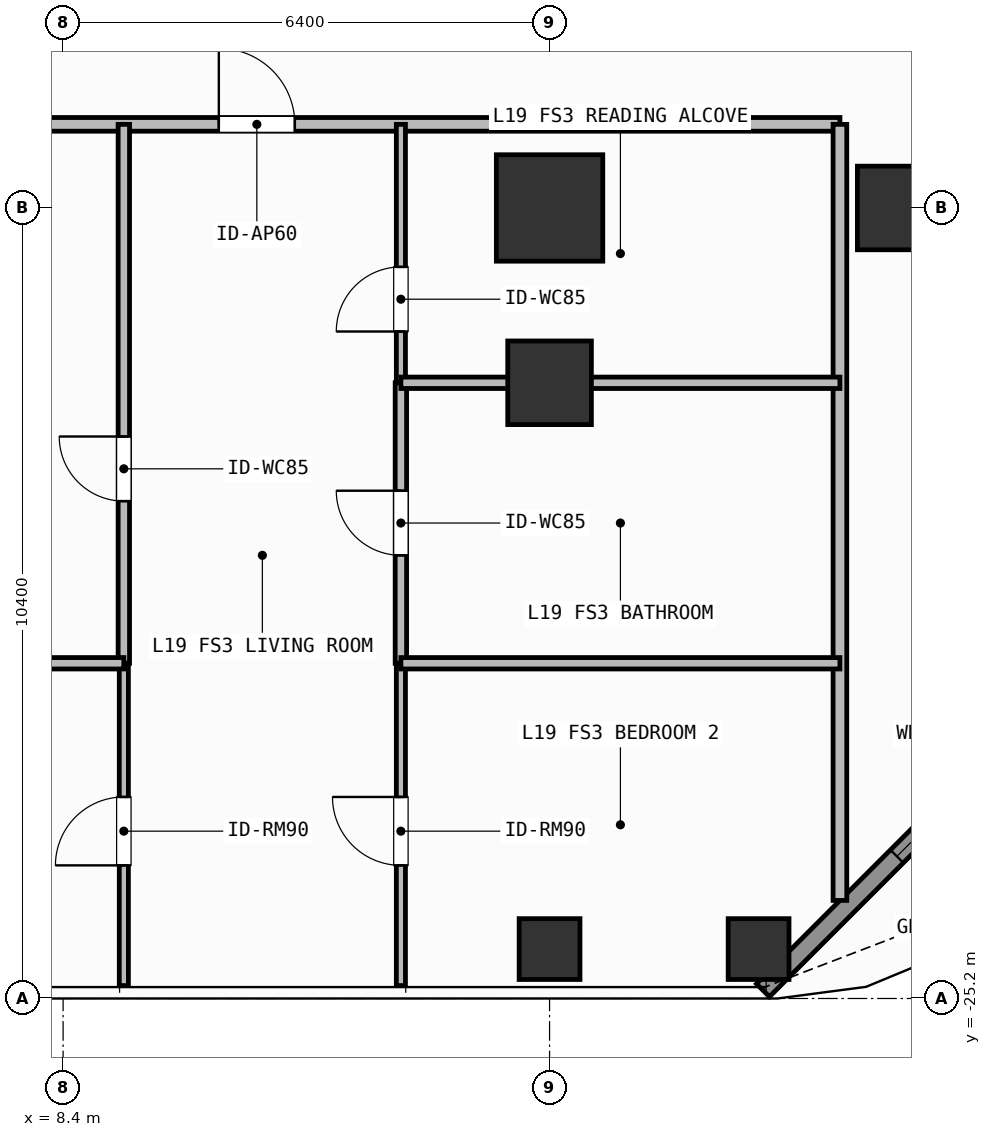
"""IFC4 building model, lengths in metres.
Left out: names, types, materials, properties, quantities, classifications, styles, units other than length and angle.
Written with IfcOpenShell. Run it as: python <this file> out.ifc"""

import sys

from ifc_helpers import new_model, si_unit, direction, frame, frame_2d, origin, origin_2d, place, context, subcontext, project, spatial, rectangle, hollow_rectangle, extrude, element, fill, save


model = new_model("IFC4")
c1 = context("Model", 3, precision=1e-05, world=origin(), true_north=direction((0.0, 1.0)))
c2 = subcontext(c1, "Body", "Model", "MODEL_VIEW")
j1 = project(units=[si_unit("LENGTHUNIT", "METRE"), si_unit("PLANEANGLEUNIT", "RADIAN")], contexts=[c1])
p1 = place(None, origin())
s1 = spatial("IfcSite", under=j1, at=p1, CompositionType="ELEMENT")
p2 = place(p1, origin())
s2 = spatial("IfcBuilding", under=s1, at=p2, CompositionType="ELEMENT")
p3 = place(p2, frame((0.0, 0.0, 73.5)))
s3 = spatial("IfcBuildingStorey", under=s2, at=p3, CompositionType="ELEMENT", Elevation=73.5)
p4 = place(p3, frame((14.8, -14.8, 0.0), z_axis=(0.0, 0.0, 1.0), x_axis=(1.0, 0.0, 0.0)))
e1 = element("IfcColumn", 1, at=p4, inside=s3, PredefinedType="COLUMN", context=c2, shape_type="SweptSolid", body=[
    extrude(rectangle(XDim=1.4, YDim=1.4, at=origin_2d()), origin(), (0.0, 0.0, 1.0), 3.9),
])
for number, where, z_axis, x_axis in (
    (2, (19.4, -14.8, 0.0), (0.0, 0.0, 1.0), (1.0, 0.0, 0.0)),
    (3, (14.8, -17.1, 0.0), (0.0, 0.0, 1.0), (1.0, 0.0, 0.0)),
):
    element("IfcColumn", number, at=place(p3, frame(where, z_axis=z_axis, x_axis=x_axis)), inside=s3, PredefinedType="COLUMN", context=c2, shape_type="SweptSolid", body=[
        extrude(rectangle(XDim=1.1, YDim=1.1, at=origin_2d()), origin(), (0.0, 0.0, 1.0), 3.9),
    ])
for number, where, z_axis, x_axis in (
    (4, (17.55, -24.55, 0.0), (0.0, 0.0, 1.0), (1.0, 0.0, 0.0)),
    (5, (14.8, -24.55, 0.0), (0.0, 0.0, 1.0), (1.0, 0.0, 0.0)),
):
    element("IfcColumn", number, at=place(p3, frame(where, z_axis=z_axis, x_axis=x_axis)), inside=s3, PredefinedType="COLUMN", context=c2, shape_type="SweptSolid", body=[
        extrude(hollow_rectangle(XDim=0.8, YDim=0.8, WallThickness=0.036, at=origin_2d()), origin(), (0.0, 0.0, 1.0), 3.9),
    ])
p5 = place(p3, frame((22.192, -20.508, 0.0), z_axis=(0.0, 0.0, 1.0), x_axis=(-0.707106781187, -0.707106781187, 0.0)))
e6 = element("IfcWall", 6, at=p5, inside=s3, PredefinedType="SOLIDWALL", context=c2, shape_type="SweptSolid", body=[
    extrude(rectangle(XDim=6.484, YDim=0.24, at=frame_2d((3.242, 0.0))), origin(), (0.0, 0.0, 1.0), 3.6),
])
p6 = place(p5, frame((2.492, 0.0, 0.8)))
e7 = element("IfcOpeningElement", 7, at=p6, cuts=e6, PredefinedType="OPENING", context=c2, shape_type="SweptSolid", body=[
    extrude(rectangle(XDim=1.5, YDim=1.85, at=frame_2d((0.75, 0.925))), frame((0.0, 0.13, 0.0), z_axis=(0.0, -1.0, 0.0), x_axis=(1.0, 0.0, 0.0)), (0.0, 0.0, 1.0), 0.26),
])
p7 = place(p3, frame((2.918, -13.7, 0.0), z_axis=(0.0, 0.0, 1.0), x_axis=(1.0, 0.0, 0.0)))
e8 = element("IfcWall", 8, at=p7, inside=s3, PredefinedType="PARTITIONING", context=c2, shape_type="SweptSolid", body=[
    extrude(rectangle(XDim=15.702, YDim=0.18, at=frame_2d((7.851, 0.0))), origin(), (0.0, 0.0, 1.0), 3.6),
])
p8 = place(p7, frame((7.531, 0.0, 0.0)))
e9 = element("IfcOpeningElement", 9, at=p8, cuts=e8, PredefinedType="OPENING", context=c2, shape_type="SweptSolid", body=[
    extrude(rectangle(XDim=1.0, YDim=2.2, at=frame_2d((0.5, 1.1))), frame((0.0, 0.1, 0.0), z_axis=(0.0, -1.0, 0.0), x_axis=(1.0, 0.0, 0.0)), (0.0, 0.0, 1.0), 0.2),
])
p9 = place(p3, frame((9.199, -20.79, 0.0), z_axis=(0.0, 0.0, 1.0), x_axis=(0.0, 1.0, 0.0)))
e10 = element("IfcWall", 10, at=p9, inside=s3, PredefinedType="PARTITIONING", context=c2, shape_type="SweptSolid", body=[
    extrude(rectangle(XDim=7.09, YDim=0.15, at=frame_2d((3.545, 0.0))), origin(), (0.0, 0.0, 1.0), 3.6),
])
p10 = place(p9, frame((2.133, 0.0, 0.0)))
e11 = element("IfcOpeningElement", 11, at=p10, cuts=e10, PredefinedType="OPENING", context=c2, shape_type="SweptSolid", body=[
    extrude(rectangle(XDim=0.85, YDim=2.1, at=frame_2d((0.425, 1.05))), frame((0.0, 0.085, 0.0), z_axis=(0.0, -1.0, 0.0), x_axis=(1.0, 0.0, 0.0)), (0.0, 0.0, 1.0), 0.17),
])
p11 = place(p3, frame((9.199, -25.03, 0.0), z_axis=(0.0, 0.0, 1.0), x_axis=(0.0, 1.0, 0.0)))
e12 = element("IfcWall", 12, at=p11, inside=s3, PredefinedType="PARTITIONING", context=c2, shape_type="SweptSolid", body=[
    extrude(rectangle(XDim=4.24, YDim=0.12, at=frame_2d((2.12, 0.0))), origin(), (0.0, 0.0, 1.0), 3.6),
])
p12 = place(p11, frame((1.581, 0.0, 0.0)))
e13 = element("IfcOpeningElement", 13, at=p12, cuts=e12, PredefinedType="OPENING", context=c2, shape_type="SweptSolid", body=[
    extrude(rectangle(XDim=0.9, YDim=2.1, at=frame_2d((0.45, 1.05))), frame((0.0, 0.07, 0.0), z_axis=(0.0, -1.0, 0.0), x_axis=(1.0, 0.0, 0.0)), (0.0, 0.0, 1.0), 0.14),
])
p13 = place(p3, frame((12.844, -20.79, 0.0), z_axis=(0.0, 0.0, 1.0), x_axis=(0.0, 1.0, 0.0)))
e14 = element("IfcWall", 14, at=p13, inside=s3, PredefinedType="PARTITIONING", context=c2, shape_type="SweptSolid", body=[
    extrude(rectangle(XDim=3.69, YDim=0.15, at=frame_2d((1.845, 0.0))), origin(), (0.0, 0.0, 1.0), 3.6),
])
p14 = place(p13, frame((1.42, 0.0, 0.0)))
e15 = element("IfcOpeningElement", 15, at=p14, cuts=e14, PredefinedType="OPENING", context=c2, shape_type="SweptSolid", body=[
    extrude(rectangle(XDim=0.85, YDim=2.1, at=frame_2d((0.425, 1.05))), frame((0.0, 0.085, 0.0), z_axis=(0.0, -1.0, 0.0), x_axis=(1.0, 0.0, 0.0)), (0.0, 0.0, 1.0), 0.17),
])
p15 = place(p3, frame((12.844, -17.1, 0.0), z_axis=(0.0, 0.0, 1.0), x_axis=(0.0, 1.0, 0.0)))
e16 = element("IfcWall", 16, at=p15, inside=s3, PredefinedType="PARTITIONING", context=c2, shape_type="SweptSolid", body=[
    extrude(rectangle(XDim=3.4, YDim=0.12, at=frame_2d((1.7, 0.0))), origin(), (0.0, 0.0, 1.0), 3.6),
])
p16 = place(p15, frame((0.675, 0.0, 0.0)))
e17 = element("IfcOpeningElement", 17, at=p16, cuts=e16, PredefinedType="OPENING", context=c2, shape_type="SweptSolid", body=[
    extrude(rectangle(XDim=0.85, YDim=2.1, at=frame_2d((0.425, 1.05))), frame((0.0, 0.07, 0.0), z_axis=(0.0, -1.0, 0.0), x_axis=(1.0, 0.0, 0.0)), (0.0, 0.0, 1.0), 0.14),
])
p17 = place(p3, frame((12.844, -25.03, 0.0), z_axis=(0.0, 0.0, 1.0), x_axis=(0.0, 1.0, 0.0)))
e18 = element("IfcWall", 18, at=p17, inside=s3, PredefinedType="PARTITIONING", context=c2, shape_type="SweptSolid", body=[
    extrude(rectangle(XDim=4.24, YDim=0.12, at=frame_2d((2.12, 0.0))), origin(), (0.0, 0.0, 1.0), 3.6),
])
p18 = place(p17, frame((1.581, 0.0, 0.0)))
e19 = element("IfcOpeningElement", 19, at=p18, cuts=e18, PredefinedType="OPENING", context=c2, shape_type="SweptSolid", body=[
    extrude(rectangle(XDim=0.9, YDim=2.1, at=frame_2d((0.45, 1.05))), frame((0.0, 0.07, 0.0), z_axis=(0.0, -1.0, 0.0), x_axis=(1.0, 0.0, 0.0)), (0.0, 0.0, 1.0), 0.14),
])
p19 = place(p3, frame((18.62, -23.91, 0.0), z_axis=(0.0, 0.0, 1.0), x_axis=(0.0, 1.0, 0.0)))
e20 = element("IfcWall", 20, at=p19, inside=s3, PredefinedType="PARTITIONING", context=c2, shape_type="SweptSolid", body=[
    extrude(rectangle(XDim=10.21, YDim=0.18, at=frame_2d((5.105, 0.0))), origin(), (0.0, 0.0, 1.0), 3.6),
])
p20 = place(p3, frame((2.918, -20.79, 0.0), z_axis=(0.0, 0.0, 1.0), x_axis=(1.0, 0.0, 0.0)))
e21 = element("IfcWall", 21, at=p20, inside=s3, PredefinedType="PARTITIONING", context=c2, shape_type="SweptSolid", body=[
    extrude(rectangle(XDim=6.281, YDim=0.15, at=frame_2d((3.141, 0.0))), origin(), (0.0, 0.0, 1.0), 3.6),
])
p21 = place(p3, frame((12.844, -17.1, 0.0), z_axis=(0.0, 0.0, 1.0), x_axis=(1.0, 0.0, 0.0)))
e22 = element("IfcWall", 22, at=p21, inside=s3, PredefinedType="PARTITIONING", context=c2, shape_type="SweptSolid", body=[
    extrude(rectangle(XDim=5.776, YDim=0.15, at=frame_2d((2.888, 0.0))), origin(), (0.0, 0.0, 1.0), 3.002),
])
p22 = place(p3, frame((12.844, -20.79, 0.0), z_axis=(0.0, 0.0, 1.0), x_axis=(1.0, 0.0, 0.0)))
e23 = element("IfcWall", 23, at=p22, inside=s3, PredefinedType="PARTITIONING", context=c2, shape_type="SweptSolid", body=[
    extrude(rectangle(XDim=5.776, YDim=0.15, at=frame_2d((2.888, 0.0))), origin(), (0.0, 0.0, 1.0), 3.6),
])
p23 = place(p6, origin())
e24 = element("IfcWindow", 24, at=p23, inside=s3, PartitioningType="SINGLE_PANEL", PredefinedType="WINDOW", context=c2, shape_type="SweptSolid", body=[
    extrude(rectangle(XDim=1.5, YDim=1.85, at=frame_2d((0.75, 0.925))), frame((0.0, 0.03, 0.0), z_axis=(0.0, -1.0, 0.0), x_axis=(1.0, 0.0, 0.0)), (0.0, 0.0, 1.0), 0.06),
])
fill(e7, e24)
p24 = place(p8, origin())
e25 = element("IfcDoor", 25, at=p24, inside=s3, OperationType="SINGLE_SWING_LEFT", PredefinedType="DOOR", context=c2, shape_type="SweptSolid", body=[
    extrude(rectangle(XDim=1.0, YDim=2.2, at=frame_2d((0.5, 1.1))), frame((0.0, 0.025, 0.0), z_axis=(0.0, -1.0, 0.0), x_axis=(1.0, 0.0, 0.0)), (0.0, 0.0, 1.0), 0.05),
])
fill(e9, e25)
p25 = place(p10, origin())
e26 = element("IfcDoor", 26, at=p25, inside=s3, OperationType="SINGLE_SWING_RIGHT", PredefinedType="DOOR", context=c2, shape_type="SweptSolid", body=[
    extrude(rectangle(XDim=0.85, YDim=2.1, at=frame_2d((0.425, 1.05))), frame((0.0, 0.025, 0.0), z_axis=(0.0, -1.0, 0.0), x_axis=(1.0, 0.0, 0.0)), (0.0, 0.0, 1.0), 0.05),
])
fill(e11, e26)
p26 = place(p12, origin())
e27 = element("IfcDoor", 27, at=p26, inside=s3, OperationType="SINGLE_SWING_LEFT", PredefinedType="DOOR", context=c2, shape_type="SweptSolid", body=[
    extrude(rectangle(XDim=0.9, YDim=2.1, at=frame_2d((0.45, 1.05))), frame((0.0, 0.025, 0.0), z_axis=(0.0, -1.0, 0.0), x_axis=(1.0, 0.0, 0.0)), (0.0, 0.0, 1.0), 0.05),
])
fill(e13, e27)
p27 = place(p14, origin())
e28 = element("IfcDoor", 28, at=p27, inside=s3, OperationType="SINGLE_SWING_RIGHT", PredefinedType="DOOR", context=c2, shape_type="SweptSolid", body=[
    extrude(rectangle(XDim=0.85, YDim=2.1, at=frame_2d((0.425, 1.05))), frame((0.0, 0.025, 0.0), z_axis=(0.0, -1.0, 0.0), x_axis=(1.0, 0.0, 0.0)), (0.0, 0.0, 1.0), 0.05),
])
fill(e15, e28)
p28 = place(p16, origin())
e29 = element("IfcDoor", 29, at=p28, inside=s3, OperationType="SINGLE_SWING_LEFT", PredefinedType="DOOR", context=c2, shape_type="SweptSolid", body=[
    extrude(rectangle(XDim=0.85, YDim=2.1, at=frame_2d((0.425, 1.05))), frame((0.0, 0.025, 0.0), z_axis=(0.0, -1.0, 0.0), x_axis=(1.0, 0.0, 0.0)), (0.0, 0.0, 1.0), 0.05),
])
fill(e17, e29)
p29 = place(p18, origin())
e30 = element("IfcDoor", 30, at=p29, inside=s3, OperationType="SINGLE_SWING_RIGHT", PredefinedType="DOOR", context=c2, shape_type="SweptSolid", body=[
    extrude(rectangle(XDim=0.9, YDim=2.1, at=frame_2d((0.45, 1.05))), frame((0.0, 0.025, 0.0), z_axis=(0.0, -1.0, 0.0), x_axis=(1.0, 0.0, 0.0)), (0.0, 0.0, 1.0), 0.05),
])
fill(e19, e30)
save(model, sys.argv[1])
